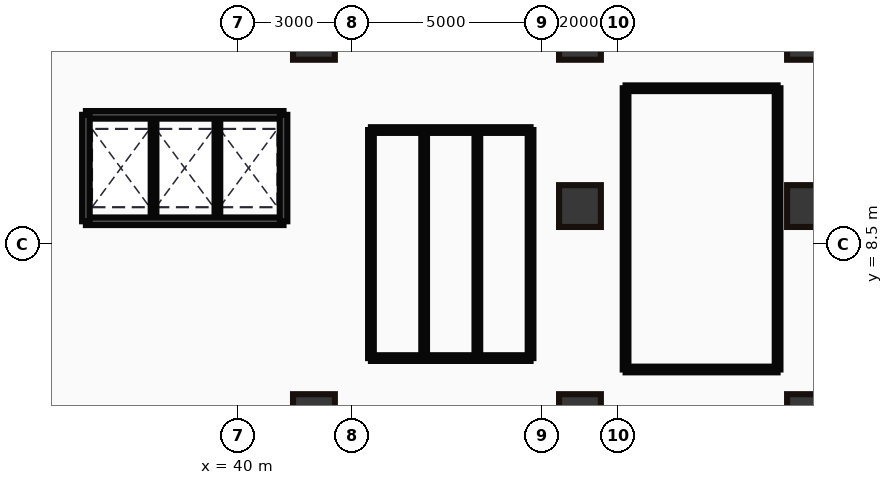
"""IFC4 building model, lengths in metres.
Left out: names, types, materials, properties, quantities, classifications, styles, units other than length and angle.
Written with IfcOpenShell. Run it as: python <this file> out.ifc"""

import sys

from ifc_helpers import new_model, si_unit, direction, frame, frame_2d, origin, origin_2d, place, context, subcontext, project, spatial, rectangle, hollow_rectangle, extrude, source, transform, mapped, element, fill, save


model = new_model("IFC4")
c1 = context("Model", 3, precision=1e-05, world=origin(), true_north=direction((0.0, 1.0)))
c2 = subcontext(c1, "Body", "Model", "MODEL_VIEW")
j1 = project(units=[si_unit("LENGTHUNIT", "METRE"), si_unit("PLANEANGLEUNIT", "RADIAN")], contexts=[c1])
p1 = place(None, origin())
s1 = spatial("IfcSite", under=j1, at=p1, CompositionType="ELEMENT")
p2 = place(p1, origin())
s2 = spatial("IfcBuilding", under=s1, at=p2, CompositionType="ELEMENT")
p3 = place(p2, frame((0.0, 0.0, 6.0)))
s3 = spatial("IfcBuildingStorey", under=s2, at=p3, CompositionType="ELEMENT", Elevation=6.0)
m1 = source(origin(), c2, "Body", "SweptSolid", [
    extrude(hollow_rectangle(XDim=1.1, YDim=1.3, WallThickness=0.055, at=origin_2d()), origin(), (0.0, 0.0, 1.0), 5.0),
])
for number, where, z_axis, x_axis in (
    (1, (42.0, 14.0, 0.0), (0.0, 0.0, 1.0), (1.0, 0.0, 0.0)),
    (2, (49.0, 14.0, 0.0), (0.0, 0.0, 1.0), (1.0, 0.0, 0.0)),
    (3, (55.0, 14.0, 0.0), (0.0, 0.0, 1.0), (1.0, 0.0, 0.0)),
):
    element("IfcColumn", number, at=place(p3, frame(where, z_axis=z_axis, x_axis=x_axis)), inside=s3, PredefinedType="PILASTER", context=c2, shape_type="MappedRepresentation", body=[
        mapped(m1, transform((0.0, 0.0, 0.0))),
    ])
m2 = source(origin(), c2, "Body", "SweptSolid", [
    extrude(hollow_rectangle(XDim=1.1, YDim=1.1, WallThickness=0.05, at=origin_2d()), origin(), (0.0, 0.0, 1.0), 5.0),
])
for number, where, z_axis, x_axis in (
    (4, (49.0, 9.5, 0.0), (0.0, 0.0, 1.0), (1.0, 0.0, 0.0)),
    (5, (55.0, 9.5, 0.0), (0.0, 0.0, 1.0), (1.0, 0.0, 0.0)),
    (6, (42.0, 4.0, 0.0), (0.0, 0.0, 1.0), (1.0, 0.0, 0.0)),
    (7, (49.0, 4.0, 0.0), (0.0, 0.0, 1.0), (1.0, 0.0, 0.0)),
    (8, (55.0, 4.0, 0.0), (0.0, 0.0, 1.0), (1.0, 0.0, 0.0)),
):
    element("IfcColumn", number, at=place(p3, frame(where, z_axis=z_axis, x_axis=x_axis)), inside=s3, PredefinedType="PILASTER", context=c2, shape_type="MappedRepresentation", body=[
        mapped(m2, transform((0.0, 0.0, 0.0))),
    ])
m3 = source(origin(), c2, "Body", "SweptSolid", [
    extrude(rectangle(XDim=5.2, YDim=0.2, at=frame_2d((2.6, 0.0))), origin(), (0.0, 0.0, 1.0), 4.7),
])
p4 = place(p3, frame((36.0, 9.1, 0.0), z_axis=(0.0, 0.0, 1.0), x_axis=(1.0, 0.0, 0.0)))
e9 = element("IfcWall", 9, at=p4, inside=s3, PredefinedType="PARTITIONING", context=c2, shape_type="MappedRepresentation", body=[
    mapped(m3, transform((0.0, 0.0, 0.0))),
])
p5 = place(p4, frame((0.32, 0.0, 0.0)))
e10 = element("IfcOpeningElement", 10, at=p5, cuts=e9, PredefinedType="OPENING", context=c2, shape_type="SweptSolid", body=[
    extrude(rectangle(XDim=1.05, YDim=2.15, at=frame_2d((0.525, 1.075))), frame((0.0, 0.11, 0.0), z_axis=(0.0, -1.0, 0.0), x_axis=(1.0, 0.0, 0.0)), (0.0, 0.0, 1.0), 0.22),
])
p6 = place(p4, frame((2.0, 0.0, 0.0)))
e11 = element("IfcOpeningElement", 11, at=p6, cuts=e9, PredefinedType="OPENING", context=c2, shape_type="SweptSolid", body=[
    extrude(rectangle(XDim=1.05, YDim=2.15, at=frame_2d((0.525, 1.075))), frame((0.0, 0.11, 0.0), z_axis=(0.0, -1.0, 0.0), x_axis=(1.0, 0.0, 0.0)), (0.0, 0.0, 1.0), 0.22),
])
p7 = place(p4, frame((3.68, 0.0, 0.0)))
e12 = element("IfcOpeningElement", 12, at=p7, cuts=e9, PredefinedType="OPENING", context=c2, shape_type="SweptSolid", body=[
    extrude(rectangle(XDim=1.05, YDim=2.15, at=frame_2d((0.525, 1.075))), frame((0.0, 0.11, 0.0), z_axis=(0.0, -1.0, 0.0), x_axis=(1.0, 0.0, 0.0)), (0.0, 0.0, 1.0), 0.22),
])
p8 = place(p3, frame((36.0, 11.9, 0.0), z_axis=(0.0, 0.0, 1.0), x_axis=(1.0, 0.0, 0.0)))
e13 = element("IfcWall", 13, at=p8, inside=s3, PredefinedType="PARTITIONING", context=c2, shape_type="MappedRepresentation", body=[
    mapped(m3, transform((0.0, 0.0, 0.0))),
])
m4 = source(origin(), c2, "Body", "SweptSolid", [
    extrude(rectangle(XDim=2.8, YDim=0.2, at=frame_2d((1.4, 0.0))), origin(), (0.0, 0.0, 1.0), 4.7),
])
for number, where, z_axis, x_axis in (
    (14, (36.0, 9.1, 0.0), (0.0, 0.0, 1.0), (0.0, 1.0, 0.0)),
    (15, (41.2, 9.1, 0.0), (0.0, 0.0, 1.0), (0.0, 1.0, 0.0)),
):
    element("IfcWall", number, at=place(p3, frame(where, z_axis=z_axis, x_axis=x_axis)), inside=s3, PredefinedType="PARTITIONING", context=c2, shape_type="MappedRepresentation", body=[
        mapped(m4, transform((0.0, 0.0, 0.0))),
    ])
m5 = source(origin(), c2, "Body", "SweptSolid", [
    extrude(rectangle(XDim=2.7, YDim=0.15, at=frame_2d((1.35, 0.0))), origin(), (0.0, 0.0, 1.0), 4.7),
])
for number, where, z_axis, x_axis in (
    (16, (37.78, 9.15, 0.0), (0.0, 0.0, 1.0), (0.0, 1.0, 0.0)),
    (17, (39.46, 9.15, 0.0), (0.0, 0.0, 1.0), (0.0, 1.0, 0.0)),
):
    element("IfcWall", number, at=place(p3, frame(where, z_axis=z_axis, x_axis=x_axis)), inside=s3, PredefinedType="PARTITIONING", context=c2, shape_type="MappedRepresentation", body=[
        mapped(m5, transform((0.0, 0.0, 0.0))),
    ])
m6 = source(origin(), c2, "Body", "SweptSolid", [
    extrude(rectangle(XDim=4.2, YDim=0.15, at=frame_2d((2.1, 0.0))), origin(), (0.0, 0.0, 1.0), 4.7),
])
p9 = place(p3, frame((43.5, 11.5, 0.0), z_axis=(0.0, 0.0, 1.0), x_axis=(1.0, 0.0, 0.0)))
e18 = element("IfcWall", 18, at=p9, inside=s3, PredefinedType="PARTITIONING", context=c2, shape_type="MappedRepresentation", body=[
    mapped(m6, transform((0.0, 0.0, 0.0))),
])
p10 = place(p9, frame((0.25, 0.0, 0.0)))
e19 = element("IfcOpeningElement", 19, at=p10, cuts=e18, PredefinedType="OPENING", context=c2, shape_type="SweptSolid", body=[
    extrude(rectangle(XDim=0.85, YDim=2.1, at=frame_2d((0.425, 1.05))), frame((0.0, 0.085, 0.0), z_axis=(0.0, -1.0, 0.0), x_axis=(1.0, 0.0, 0.0)), (0.0, 0.0, 1.0), 0.17),
])
p11 = place(p9, frame((1.65, 0.0, 0.0)))
e20 = element("IfcOpeningElement", 20, at=p11, cuts=e18, PredefinedType="OPENING", context=c2, shape_type="SweptSolid", body=[
    extrude(rectangle(XDim=0.85, YDim=2.1, at=frame_2d((0.425, 1.05))), frame((0.0, 0.085, 0.0), z_axis=(0.0, -1.0, 0.0), x_axis=(1.0, 0.0, 0.0)), (0.0, 0.0, 1.0), 0.17),
])
p12 = place(p9, frame((3.0, 0.0, 0.0)))
e21 = element("IfcOpeningElement", 21, at=p12, cuts=e18, PredefinedType="OPENING", context=c2, shape_type="SweptSolid", body=[
    extrude(rectangle(XDim=0.9, YDim=2.1, at=frame_2d((0.45, 1.05))), frame((0.0, 0.085, 0.0), z_axis=(0.0, -1.0, 0.0), x_axis=(1.0, 0.0, 0.0)), (0.0, 0.0, 1.0), 0.17),
])
p13 = place(p3, frame((43.5, 5.5, 0.0), z_axis=(0.0, 0.0, 1.0), x_axis=(1.0, 0.0, 0.0)))
e22 = element("IfcWall", 22, at=p13, inside=s3, PredefinedType="PARTITIONING", context=c2, shape_type="MappedRepresentation", body=[
    mapped(m6, transform((0.0, 0.0, 0.0))),
])
m7 = source(origin(), c2, "Body", "SweptSolid", [
    extrude(rectangle(XDim=6.0, YDim=0.15, at=frame_2d((3.0, 0.0))), origin(), (0.0, 0.0, 1.0), 4.7),
])
for number, where, z_axis, x_axis in (
    (23, (43.5, 5.5, 0.0), (0.0, 0.0, 1.0), (0.0, 1.0, 0.0)),
    (24, (47.7, 5.5, 0.0), (0.0, 0.0, 1.0), (0.0, 1.0, 0.0)),
    (25, (44.9, 5.5, 0.0), (0.0, 0.0, 1.0), (0.0, 1.0, 0.0)),
    (26, (46.3, 5.5, 0.0), (0.0, 0.0, 1.0), (0.0, 1.0, 0.0)),
):
    element("IfcWall", number, at=place(p3, frame(where, z_axis=z_axis, x_axis=x_axis)), inside=s3, PredefinedType="PARTITIONING", context=c2, shape_type="MappedRepresentation", body=[
        mapped(m7, transform((0.0, 0.0, 0.0))),
    ])
m8 = source(origin(), c2, "Body", "SweptSolid", [
    extrude(rectangle(XDim=4.0, YDim=0.15, at=frame_2d((2.0, 0.0))), origin(), (0.0, 0.0, 1.0), 4.7),
])
p14 = place(p3, frame((50.2, 12.6, 0.0), z_axis=(0.0, 0.0, 1.0), x_axis=(1.0, 0.0, 0.0)))
e27 = element("IfcWall", 27, at=p14, inside=s3, PredefinedType="PARTITIONING", context=c2, shape_type="MappedRepresentation", body=[
    mapped(m8, transform((0.0, 0.0, 0.0))),
])
p15 = place(p14, frame((1.4, 0.0, 0.0)))
e28 = element("IfcOpeningElement", 28, at=p15, cuts=e27, PredefinedType="OPENING", context=c2, shape_type="SweptSolid", body=[
    extrude(rectangle(XDim=0.95, YDim=2.15, at=frame_2d((0.475, 1.075))), frame((0.0, 0.085, 0.0), z_axis=(0.0, -1.0, 0.0), x_axis=(1.0, 0.0, 0.0)), (0.0, 0.0, 1.0), 0.17),
])
p16 = place(p3, frame((50.2, 5.2, 0.0), z_axis=(0.0, 0.0, 1.0), x_axis=(1.0, 0.0, 0.0)))
e29 = element("IfcWall", 29, at=p16, inside=s3, PredefinedType="PARTITIONING", context=c2, shape_type="MappedRepresentation", body=[
    mapped(m8, transform((0.0, 0.0, 0.0))),
])
m9 = source(origin(), c2, "Body", "SweptSolid", [
    extrude(rectangle(XDim=7.4, YDim=0.15, at=frame_2d((3.7, 0.0))), origin(), (0.0, 0.0, 1.0), 4.7),
])
for number, where, z_axis, x_axis in (
    (30, (50.2, 5.2, 0.0), (0.0, 0.0, 1.0), (0.0, 1.0, 0.0)),
    (31, (54.2, 5.2, 0.0), (0.0, 0.0, 1.0), (0.0, 1.0, 0.0)),
):
    element("IfcWall", number, at=place(p3, frame(where, z_axis=z_axis, x_axis=x_axis)), inside=s3, PredefinedType="PARTITIONING", context=c2, shape_type="MappedRepresentation", body=[
        mapped(m9, transform((0.0, 0.0, 0.0))),
    ])
m10 = source(origin(), c2, "Body", "SweptSolid", [
    extrude(rectangle(XDim=1.05, YDim=2.15, at=frame_2d((0.525, 1.075))), frame((0.0, 0.025, 0.0), z_axis=(0.0, -1.0, 0.0), x_axis=(1.0, 0.0, 0.0)), (0.0, 0.0, 1.0), 0.05),
])
p17 = place(p5, frame((1.05, 0.0, 0.0), z_axis=(0.0, 0.0, 1.0), x_axis=(-1.0, 0.0, 0.0)))
e32 = element("IfcDoor", 32, at=p17, inside=s3, OperationType="SLIDING_TO_LEFT", PredefinedType="DOOR", context=c2, shape_type="MappedRepresentation", body=[
    mapped(m10, transform((0.0, 0.0, 0.0))),
])
fill(e10, e32)
p18 = place(p6, frame((1.05, 0.0, 0.0), z_axis=(0.0, 0.0, 1.0), x_axis=(-1.0, 0.0, 0.0)))
e33 = element("IfcDoor", 33, at=p18, inside=s3, OperationType="SLIDING_TO_LEFT", PredefinedType="DOOR", context=c2, shape_type="MappedRepresentation", body=[
    mapped(m10, transform((0.0, 0.0, 0.0))),
])
fill(e11, e33)
p19 = place(p7, frame((1.05, 0.0, 0.0), z_axis=(0.0, 0.0, 1.0), x_axis=(-1.0, 0.0, 0.0)))
e34 = element("IfcDoor", 34, at=p19, inside=s3, OperationType="SLIDING_TO_LEFT", PredefinedType="DOOR", context=c2, shape_type="MappedRepresentation", body=[
    mapped(m10, transform((0.0, 0.0, 0.0))),
])
fill(e12, e34)
m11 = source(origin(), c2, "Body", "SweptSolid", [
    extrude(rectangle(XDim=0.85, YDim=2.1, at=frame_2d((0.425, 1.05))), frame((0.0, 0.025, 0.0), z_axis=(0.0, -1.0, 0.0), x_axis=(1.0, 0.0, 0.0)), (0.0, 0.0, 1.0), 0.05),
])
p20 = place(p10, frame((0.85, 0.0, 0.0), z_axis=(0.0, 0.0, 1.0), x_axis=(-1.0, 0.0, 0.0)))
e35 = element("IfcDoor", 35, at=p20, inside=s3, OperationType="SINGLE_SWING_LEFT", PredefinedType="DOOR", context=c2, shape_type="MappedRepresentation", body=[
    mapped(m11, transform((0.0, 0.0, 0.0))),
])
fill(e19, e35)
p21 = place(p11, frame((0.85, 0.0, 0.0), z_axis=(0.0, 0.0, 1.0), x_axis=(-1.0, 0.0, 0.0)))
e36 = element("IfcDoor", 36, at=p21, inside=s3, OperationType="SINGLE_SWING_RIGHT", PredefinedType="DOOR", context=c2, shape_type="MappedRepresentation", body=[
    mapped(m11, transform((0.0, 0.0, 0.0))),
])
fill(e20, e36)
m12 = source(origin(), c2, "Body", "SweptSolid", [
    extrude(rectangle(XDim=0.9, YDim=2.1, at=frame_2d((0.45, 1.05))), frame((0.0, 0.025, 0.0), z_axis=(0.0, -1.0, 0.0), x_axis=(1.0, 0.0, 0.0)), (0.0, 0.0, 1.0), 0.05),
])
p22 = place(p12, frame((0.9, 0.0, 0.0), z_axis=(0.0, 0.0, 1.0), x_axis=(-1.0, 0.0, 0.0)))
e37 = element("IfcDoor", 37, at=p22, inside=s3, OperationType="SINGLE_SWING_LEFT", PredefinedType="DOOR", context=c2, shape_type="MappedRepresentation", body=[
    mapped(m12, transform((0.0, 0.0, 0.0))),
])
fill(e21, e37)
m13 = source(origin(), c2, "Body", "SweptSolid", [
    extrude(rectangle(XDim=0.95, YDim=2.15, at=frame_2d((0.475, 1.075))), frame((0.0, 0.025, 0.0), z_axis=(0.0, -1.0, 0.0), x_axis=(1.0, 0.0, 0.0)), (0.0, 0.0, 1.0), 0.05),
])
p23 = place(p15, frame((0.95, 0.0, 0.0), z_axis=(0.0, 0.0, 1.0), x_axis=(-1.0, 0.0, 0.0)))
e38 = element("IfcDoor", 38, at=p23, inside=s3, OperationType="SINGLE_SWING_LEFT", PredefinedType="DOOR", context=c2, shape_type="MappedRepresentation", body=[
    mapped(m13, transform((0.0, 0.0, 0.0))),
])
fill(e28, e38)
save(model, sys.argv[1])
